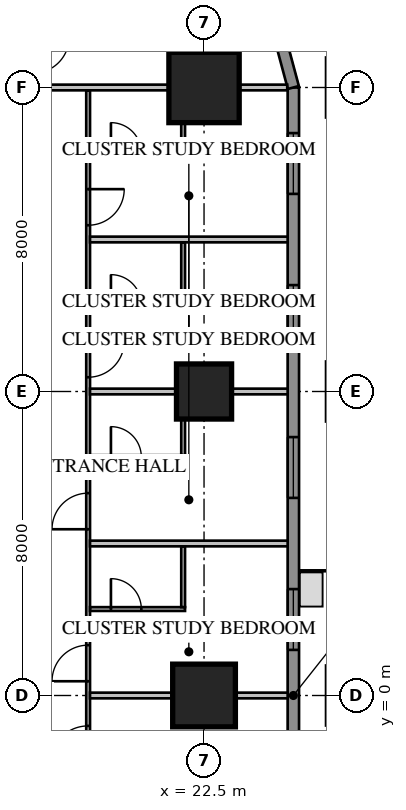
"""IFC4 building model, lengths in metres.
Left out: names, types, materials, properties, quantities, classifications, styles, units other than length and angle.
Written with IfcOpenShell. Run it as: python <this file> out.ifc"""

import sys

from ifc_helpers import new_model, si_unit, direction, frame, frame_2d, origin, origin_2d, place, context, subcontext, project, spatial, rectangle, extrude, element, fill, save


model = new_model("IFC4")
c1 = context("Model", 3, precision=1e-05, world=origin(), true_north=direction((0.0, 1.0)))
c2 = subcontext(c1, "Body", "Model", "MODEL_VIEW")
j1 = project(units=[si_unit("LENGTHUNIT", "METRE"), si_unit("PLANEANGLEUNIT", "RADIAN")], contexts=[c1])
p1 = place(None, origin())
s1 = spatial("IfcSite", under=j1, at=p1, CompositionType="ELEMENT")
p2 = place(p1, origin())
s2 = spatial("IfcBuilding", under=s1, at=p2, CompositionType="ELEMENT")
p3 = place(p2, frame((0.0, 0.0, 46.8)))
s3 = spatial("IfcBuildingStorey", under=s2, at=p3, CompositionType="ELEMENT", Elevation=46.8)
p4 = place(p3, frame((22.5, 0.0, 0.0), z_axis=(0.0, 0.0, 1.0), x_axis=(1.0, 0.0, 0.0)))
e1 = element("IfcColumn", 1, at=p4, inside=s3, PredefinedType="COLUMN", context=c2, shape_type="SweptSolid", body=[
    extrude(rectangle(XDim=1.65, YDim=1.65, at=origin_2d()), origin(), (0.0, 0.0, 1.0), 3.85),
])
p5 = place(p3, frame((22.5, 8.0, 0.0), z_axis=(0.0, 0.0, 1.0), x_axis=(1.0, 0.0, 0.0)))
e2 = element("IfcColumn", 2, at=p5, inside=s3, PredefinedType="COLUMN", context=c2, shape_type="SweptSolid", body=[
    extrude(rectangle(XDim=1.45, YDim=1.45, at=origin_2d()), origin(), (0.0, 0.0, 1.0), 3.85),
])
p6 = place(p3, frame((22.5, 16.0, 0.0), z_axis=(0.0, 0.0, 1.0), x_axis=(1.0, 0.0, 0.0)))
e3 = element("IfcColumn", 3, at=p6, inside=s3, PredefinedType="COLUMN", context=c2, shape_type="SweptSolid", body=[
    extrude(rectangle(XDim=1.85, YDim=1.85, at=origin_2d()), origin(), (0.0, 0.0, 1.0), 3.85),
])
p7 = place(p3, frame((24.85, -16.0, 0.0), z_axis=(0.0, 0.0, 1.0), x_axis=(0.0, 1.0, 0.0)))
e4 = element("IfcWall", 4, at=p7, inside=s3, PredefinedType="SOLIDWALL", context=c2, shape_type="SweptSolid", body=[
    extrude(rectangle(XDim=32.0, YDim=0.3, at=frame_2d((16.0, 0.0))), origin(), (0.0, 0.0, 1.0), 3.65),
])
p8 = place(p7, frame((1.2, 0.0, 0.75)))
e5 = element("IfcOpeningElement", 5, at=p8, cuts=e4, PredefinedType="OPENING", context=c2, shape_type="SweptSolid", body=[
    extrude(rectangle(XDim=1.6, YDim=1.8, at=frame_2d((0.8, 0.9))), frame((0.0, 0.17, 0.0), z_axis=(0.0, -1.0, 0.0), x_axis=(1.0, 0.0, 0.0)), (0.0, 0.0, 1.0), 0.34),
])
p9 = place(p7, frame((5.2, 0.0, 0.75)))
e6 = element("IfcOpeningElement", 6, at=p9, cuts=e4, PredefinedType="OPENING", context=c2, shape_type="SweptSolid", body=[
    extrude(rectangle(XDim=1.6, YDim=1.8, at=frame_2d((0.8, 0.9))), frame((0.0, 0.17, 0.0), z_axis=(0.0, -1.0, 0.0), x_axis=(1.0, 0.0, 0.0)), (0.0, 0.0, 1.0), 0.34),
])
p10 = place(p7, frame((17.2, 0.0, 0.75)))
e7 = element("IfcOpeningElement", 7, at=p10, cuts=e4, PredefinedType="OPENING", context=c2, shape_type="SweptSolid", body=[
    extrude(rectangle(XDim=1.6, YDim=1.8, at=frame_2d((0.8, 0.9))), frame((0.0, 0.17, 0.0), z_axis=(0.0, -1.0, 0.0), x_axis=(1.0, 0.0, 0.0)), (0.0, 0.0, 1.0), 0.34),
])
p11 = place(p7, frame((21.2, 0.0, 0.75)))
e8 = element("IfcOpeningElement", 8, at=p11, cuts=e4, PredefinedType="OPENING", context=c2, shape_type="SweptSolid", body=[
    extrude(rectangle(XDim=1.6, YDim=1.8, at=frame_2d((0.8, 0.9))), frame((0.0, 0.17, 0.0), z_axis=(0.0, -1.0, 0.0), x_axis=(1.0, 0.0, 0.0)), (0.0, 0.0, 1.0), 0.34),
])
p12 = place(p7, frame((25.2, 0.0, 0.75)))
e9 = element("IfcOpeningElement", 9, at=p12, cuts=e4, PredefinedType="OPENING", context=c2, shape_type="SweptSolid", body=[
    extrude(rectangle(XDim=1.6, YDim=1.8, at=frame_2d((0.8, 0.9))), frame((0.0, 0.17, 0.0), z_axis=(0.0, -1.0, 0.0), x_axis=(1.0, 0.0, 0.0)), (0.0, 0.0, 1.0), 0.34),
])
p13 = place(p7, frame((29.2, 0.0, 0.75)))
e10 = element("IfcOpeningElement", 10, at=p13, cuts=e4, PredefinedType="OPENING", context=c2, shape_type="SweptSolid", body=[
    extrude(rectangle(XDim=1.6, YDim=1.8, at=frame_2d((0.8, 0.9))), frame((0.0, 0.17, 0.0), z_axis=(0.0, -1.0, 0.0), x_axis=(1.0, 0.0, 0.0)), (0.0, 0.0, 1.0), 0.34),
])
p14 = place(p7, frame((8.8, 0.0, 0.75)))
e11 = element("IfcOpeningElement", 11, at=p14, cuts=e4, PredefinedType="OPENING", context=c2, shape_type="SweptSolid", body=[
    extrude(rectangle(XDim=2.4, YDim=1.8, at=frame_2d((1.2, 0.9))), frame((0.0, 0.17, 0.0), z_axis=(0.0, -1.0, 0.0), x_axis=(1.0, 0.0, 0.0)), (0.0, 0.0, 1.0), 0.34),
])
p15 = place(p7, frame((13.812, 0.0, 0.0)))
e12 = element("IfcOpeningElement", 12, at=p15, cuts=e4, PredefinedType="OPENING", context=c2, shape_type="SweptSolid", body=[
    extrude(rectangle(XDim=1.0, YDim=2.4, at=frame_2d((0.5, 1.2))), frame((0.0, 0.17, 0.0), z_axis=(0.0, -1.0, 0.0), x_axis=(1.0, 0.0, 0.0)), (0.0, 0.0, 1.0), 0.34),
])
p16 = place(p3, frame((24.85, 16.0, 0.0), z_axis=(0.0, 0.0, 1.0), x_axis=(-0.258839972501, 0.965920218567, 0.0)))
e13 = element("IfcWall", 13, at=p16, inside=s3, PredefinedType="SOLIDWALL", context=c2, shape_type="SweptSolid", body=[
    extrude(rectangle(XDim=4.581, YDim=0.3, at=frame_2d((2.291, 0.0))), origin(), (0.0, 0.0, 1.0), 3.65),
])
p17 = place(p3, frame((19.45, -3.925, 0.0), z_axis=(0.0, 0.0, 1.0), x_axis=(0.0, 1.0, 0.0)))
e14 = element("IfcWall", 14, at=p17, inside=s3, PredefinedType="PARTITIONING", context=c2, shape_type="SweptSolid", body=[
    extrude(rectangle(XDim=19.85, YDim=0.1, at=frame_2d((9.925, 0.0))), origin(), (0.0, 0.0, 1.0), 3.65),
])
p18 = place(p17, frame((2.125, 0.0, 0.0)))
e15 = element("IfcOpeningElement", 15, at=p18, cuts=e14, PredefinedType="OPENING", context=c2, shape_type="SweptSolid", body=[
    extrude(rectangle(XDim=1.0, YDim=2.1, at=frame_2d((0.5, 1.05))), frame((0.0, 0.07, 0.0), z_axis=(0.0, -1.0, 0.0), x_axis=(1.0, 0.0, 0.0)), (0.0, 0.0, 1.0), 0.14),
])
p19 = place(p17, frame((0.3, 0.0, 0.0)))
e16 = element("IfcOpeningElement", 16, at=p19, cuts=e14, PredefinedType="OPENING", context=c2, shape_type="SweptSolid", body=[
    extrude(rectangle(XDim=0.8, YDim=2.1, at=frame_2d((0.4, 1.05))), frame((0.0, 0.07, 0.0), z_axis=(0.0, -1.0, 0.0), x_axis=(1.0, 0.0, 0.0)), (0.0, 0.0, 1.0), 0.14),
])
p20 = place(p17, frame((4.3, 0.0, 0.0)))
e17 = element("IfcOpeningElement", 17, at=p20, cuts=e14, PredefinedType="OPENING", context=c2, shape_type="SweptSolid", body=[
    extrude(rectangle(XDim=0.95, YDim=2.1, at=frame_2d((0.475, 1.05))), frame((0.0, 0.07, 0.0), z_axis=(0.0, -1.0, 0.0), x_axis=(1.0, 0.0, 0.0)), (0.0, 0.0, 1.0), 0.14),
])
p21 = place(p17, frame((8.3, 0.0, 0.0)))
e18 = element("IfcOpeningElement", 18, at=p21, cuts=e14, PredefinedType="OPENING", context=c2, shape_type="SweptSolid", body=[
    extrude(rectangle(XDim=0.95, YDim=2.1, at=frame_2d((0.475, 1.05))), frame((0.0, 0.07, 0.0), z_axis=(0.0, -1.0, 0.0), x_axis=(1.0, 0.0, 0.0)), (0.0, 0.0, 1.0), 0.14),
])
p22 = place(p17, frame((12.3, 0.0, 0.0)))
e19 = element("IfcOpeningElement", 19, at=p22, cuts=e14, PredefinedType="OPENING", context=c2, shape_type="SweptSolid", body=[
    extrude(rectangle(XDim=0.95, YDim=2.1, at=frame_2d((0.475, 1.05))), frame((0.0, 0.07, 0.0), z_axis=(0.0, -1.0, 0.0), x_axis=(1.0, 0.0, 0.0)), (0.0, 0.0, 1.0), 0.14),
])
p23 = place(p17, frame((16.3, 0.0, 0.0)))
e20 = element("IfcOpeningElement", 20, at=p23, cuts=e14, PredefinedType="OPENING", context=c2, shape_type="SweptSolid", body=[
    extrude(rectangle(XDim=0.95, YDim=2.1, at=frame_2d((0.475, 1.05))), frame((0.0, 0.07, 0.0), z_axis=(0.0, -1.0, 0.0), x_axis=(1.0, 0.0, 0.0)), (0.0, 0.0, 1.0), 0.14),
])
p24 = place(p3, frame((19.5, 0.0, 0.0), z_axis=(0.0, 0.0, 1.0), x_axis=(1.0, 0.0, 0.0)))
e21 = element("IfcWall", 21, at=p24, inside=s3, PredefinedType="PARTITIONING", context=c2, shape_type="SweptSolid", body=[
    extrude(rectangle(XDim=5.2, YDim=0.15, at=frame_2d((2.6, 0.0))), origin(), (0.0, 0.0, 1.0), 2.957),
])
for number, where, z_axis, x_axis in (
    (22, (19.5, 4.0, 0.0), (0.0, 0.0, 1.0), (1.0, 0.0, 0.0)),
    (23, (19.5, 8.0, 0.0), (0.0, 0.0, 1.0), (1.0, 0.0, 0.0)),
    (24, (19.5, 12.0, 0.0), (0.0, 0.0, 1.0), (1.0, 0.0, 0.0)),
):
    element("IfcWall", number, at=place(p3, frame(where, z_axis=z_axis, x_axis=x_axis)), inside=s3, PredefinedType="PARTITIONING", context=c2, shape_type="SweptSolid", body=[
        extrude(rectangle(XDim=5.2, YDim=0.15, at=frame_2d((2.6, 0.0))), origin(), (0.0, 0.0, 1.0), 3.65),
    ])
p25 = place(p3, frame((18.1, 16.0, 0.0), z_axis=(0.0, 0.0, 1.0), x_axis=(1.0, 0.0, 0.0)))
e25 = element("IfcWall", 25, at=p25, inside=s3, PredefinedType="PARTITIONING", context=c2, shape_type="SweptSolid", body=[
    extrude(rectangle(XDim=6.589, YDim=0.15, at=frame_2d((3.295, 0.0))), origin(), (0.0, 0.0, 1.0), 3.65),
])
p26 = place(p3, frame((19.5, 2.275, 0.0), z_axis=(0.0, 0.0, 1.0), x_axis=(1.0, 0.0, 0.0)))
e26 = element("IfcWall", 26, at=p26, inside=s3, PredefinedType="PARTITIONING", context=c2, shape_type="SweptSolid", body=[
    extrude(rectangle(XDim=2.5, YDim=0.1, at=frame_2d((1.25, 0.0))), origin(), (0.0, 0.0, 1.0), 3.65),
])
p27 = place(p26, frame((0.55, 0.0, 0.0)))
e27 = element("IfcOpeningElement", 27, at=p27, cuts=e26, PredefinedType="OPENING", context=c2, shape_type="SweptSolid", body=[
    extrude(rectangle(XDim=0.8, YDim=2.1, at=frame_2d((0.4, 1.05))), frame((0.0, 0.07, 0.0), z_axis=(0.0, -1.0, 0.0), x_axis=(1.0, 0.0, 0.0)), (0.0, 0.0, 1.0), 0.14),
])
p28 = place(p3, frame((21.95, 2.325, 0.0), z_axis=(0.0, 0.0, 1.0), x_axis=(0.0, 1.0, 0.0)))
e28 = element("IfcWall", 28, at=p28, inside=s3, PredefinedType="PARTITIONING", context=c2, shape_type="SweptSolid", body=[
    extrude(rectangle(XDim=1.6, YDim=0.1, at=frame_2d((0.8, 0.0))), origin(), (0.0, 0.0, 1.0), 3.65),
])
p29 = place(p3, frame((19.5, 6.275, 0.0), z_axis=(0.0, 0.0, 1.0), x_axis=(1.0, 0.0, 0.0)))
e29 = element("IfcWall", 29, at=p29, inside=s3, PredefinedType="PARTITIONING", context=c2, shape_type="SweptSolid", body=[
    extrude(rectangle(XDim=2.5, YDim=0.1, at=frame_2d((1.25, 0.0))), origin(), (0.0, 0.0, 1.0), 3.65),
])
p30 = place(p29, frame((0.55, 0.0, 0.0)))
e30 = element("IfcOpeningElement", 30, at=p30, cuts=e29, PredefinedType="OPENING", context=c2, shape_type="SweptSolid", body=[
    extrude(rectangle(XDim=0.8, YDim=2.1, at=frame_2d((0.4, 1.05))), frame((0.0, 0.07, 0.0), z_axis=(0.0, -1.0, 0.0), x_axis=(1.0, 0.0, 0.0)), (0.0, 0.0, 1.0), 0.14),
])
p31 = place(p3, frame((21.95, 6.325, 0.0), z_axis=(0.0, 0.0, 1.0), x_axis=(0.0, 1.0, 0.0)))
e31 = element("IfcWall", 31, at=p31, inside=s3, PredefinedType="PARTITIONING", context=c2, shape_type="SweptSolid", body=[
    extrude(rectangle(XDim=1.6, YDim=0.1, at=frame_2d((0.8, 0.0))), origin(), (0.0, 0.0, 1.0), 3.65),
])
p32 = place(p3, frame((19.5, 10.275, 0.0), z_axis=(0.0, 0.0, 1.0), x_axis=(1.0, 0.0, 0.0)))
e32 = element("IfcWall", 32, at=p32, inside=s3, PredefinedType="PARTITIONING", context=c2, shape_type="SweptSolid", body=[
    extrude(rectangle(XDim=2.5, YDim=0.1, at=frame_2d((1.25, 0.0))), origin(), (0.0, 0.0, 1.0), 3.65),
])
p33 = place(p32, frame((0.55, 0.0, 0.0)))
e33 = element("IfcOpeningElement", 33, at=p33, cuts=e32, PredefinedType="OPENING", context=c2, shape_type="SweptSolid", body=[
    extrude(rectangle(XDim=0.8, YDim=2.1, at=frame_2d((0.4, 1.05))), frame((0.0, 0.07, 0.0), z_axis=(0.0, -1.0, 0.0), x_axis=(1.0, 0.0, 0.0)), (0.0, 0.0, 1.0), 0.14),
])
p34 = place(p3, frame((21.95, 10.325, 0.0), z_axis=(0.0, 0.0, 1.0), x_axis=(0.0, 1.0, 0.0)))
e34 = element("IfcWall", 34, at=p34, inside=s3, PredefinedType="PARTITIONING", context=c2, shape_type="SweptSolid", body=[
    extrude(rectangle(XDim=1.6, YDim=0.1, at=frame_2d((0.8, 0.0))), origin(), (0.0, 0.0, 1.0), 3.65),
])
p35 = place(p3, frame((19.5, 14.275, 0.0), z_axis=(0.0, 0.0, 1.0), x_axis=(1.0, 0.0, 0.0)))
e35 = element("IfcWall", 35, at=p35, inside=s3, PredefinedType="PARTITIONING", context=c2, shape_type="SweptSolid", body=[
    extrude(rectangle(XDim=2.5, YDim=0.1, at=frame_2d((1.25, 0.0))), origin(), (0.0, 0.0, 1.0), 3.65),
])
p36 = place(p35, frame((0.55, 0.0, 0.0)))
e36 = element("IfcOpeningElement", 36, at=p36, cuts=e35, PredefinedType="OPENING", context=c2, shape_type="SweptSolid", body=[
    extrude(rectangle(XDim=0.8, YDim=2.1, at=frame_2d((0.4, 1.05))), frame((0.0, 0.07, 0.0), z_axis=(0.0, -1.0, 0.0), x_axis=(1.0, 0.0, 0.0)), (0.0, 0.0, 1.0), 0.14),
])
p37 = place(p3, frame((21.95, 14.325, 0.0), z_axis=(0.0, 0.0, 1.0), x_axis=(0.0, 1.0, 0.0)))
e37 = element("IfcWall", 37, at=p37, inside=s3, PredefinedType="PARTITIONING", context=c2, shape_type="SweptSolid", body=[
    extrude(rectangle(XDim=1.6, YDim=0.1, at=frame_2d((0.8, 0.0))), origin(), (0.0, 0.0, 1.0), 3.65),
])
p38 = place(p10, origin())
e38 = element("IfcWindow", 38, at=p38, inside=s3, PartitioningType="SINGLE_PANEL", PredefinedType="WINDOW", context=c2, shape_type="SweptSolid", body=[
    extrude(rectangle(XDim=1.6, YDim=1.8, at=frame_2d((0.8, 0.9))), frame((0.0, 0.03, 0.0), z_axis=(0.0, -1.0, 0.0), x_axis=(1.0, 0.0, 0.0)), (0.0, 0.0, 1.0), 0.06),
])
fill(e7, e38)
p39 = place(p11, origin())
e39 = element("IfcWindow", 39, at=p39, inside=s3, PartitioningType="SINGLE_PANEL", PredefinedType="WINDOW", context=c2, shape_type="SweptSolid", body=[
    extrude(rectangle(XDim=1.6, YDim=1.8, at=frame_2d((0.8, 0.9))), frame((0.0, 0.03, 0.0), z_axis=(0.0, -1.0, 0.0), x_axis=(1.0, 0.0, 0.0)), (0.0, 0.0, 1.0), 0.06),
])
fill(e8, e39)
p40 = place(p12, origin())
e40 = element("IfcWindow", 40, at=p40, inside=s3, PartitioningType="SINGLE_PANEL", PredefinedType="WINDOW", context=c2, shape_type="SweptSolid", body=[
    extrude(rectangle(XDim=1.6, YDim=1.8, at=frame_2d((0.8, 0.9))), frame((0.0, 0.03, 0.0), z_axis=(0.0, -1.0, 0.0), x_axis=(1.0, 0.0, 0.0)), (0.0, 0.0, 1.0), 0.06),
])
fill(e9, e40)
p41 = place(p13, origin())
e41 = element("IfcWindow", 41, at=p41, inside=s3, PartitioningType="SINGLE_PANEL", PredefinedType="WINDOW", context=c2, shape_type="SweptSolid", body=[
    extrude(rectangle(XDim=1.6, YDim=1.8, at=frame_2d((0.8, 0.9))), frame((0.0, 0.03, 0.0), z_axis=(0.0, -1.0, 0.0), x_axis=(1.0, 0.0, 0.0)), (0.0, 0.0, 1.0), 0.06),
])
fill(e10, e41)
p42 = place(p18, origin())
e42 = element("IfcDoor", 42, at=p42, inside=s3, OperationType="SINGLE_SWING_LEFT", PredefinedType="DOOR", context=c2, shape_type="SweptSolid", body=[
    extrude(rectangle(XDim=1.0, YDim=2.1, at=frame_2d((0.5, 1.05))), frame((0.0, 0.025, 0.0), z_axis=(0.0, -1.0, 0.0), x_axis=(1.0, 0.0, 0.0)), (0.0, 0.0, 1.0), 0.05),
])
fill(e15, e42)
p43 = place(p20, origin())
e43 = element("IfcDoor", 43, at=p43, inside=s3, OperationType="SINGLE_SWING_LEFT", PredefinedType="DOOR", context=c2, shape_type="SweptSolid", body=[
    extrude(rectangle(XDim=0.95, YDim=2.1, at=frame_2d((0.475, 1.05))), frame((0.0, 0.025, 0.0), z_axis=(0.0, -1.0, 0.0), x_axis=(1.0, 0.0, 0.0)), (0.0, 0.0, 1.0), 0.05),
])
fill(e17, e43)
p44 = place(p27, origin())
e44 = element("IfcDoor", 44, at=p44, inside=s3, OperationType="SINGLE_SWING_LEFT", PredefinedType="DOOR", context=c2, shape_type="SweptSolid", body=[
    extrude(rectangle(XDim=0.8, YDim=2.1, at=frame_2d((0.4, 1.05))), frame((0.0, 0.025, 0.0), z_axis=(0.0, -1.0, 0.0), x_axis=(1.0, 0.0, 0.0)), (0.0, 0.0, 1.0), 0.05),
])
fill(e27, e44)
p45 = place(p21, origin())
e45 = element("IfcDoor", 45, at=p45, inside=s3, OperationType="SINGLE_SWING_LEFT", PredefinedType="DOOR", context=c2, shape_type="SweptSolid", body=[
    extrude(rectangle(XDim=0.95, YDim=2.1, at=frame_2d((0.475, 1.05))), frame((0.0, 0.025, 0.0), z_axis=(0.0, -1.0, 0.0), x_axis=(1.0, 0.0, 0.0)), (0.0, 0.0, 1.0), 0.05),
])
fill(e18, e45)
p46 = place(p30, origin())
e46 = element("IfcDoor", 46, at=p46, inside=s3, OperationType="SINGLE_SWING_LEFT", PredefinedType="DOOR", context=c2, shape_type="SweptSolid", body=[
    extrude(rectangle(XDim=0.8, YDim=2.1, at=frame_2d((0.4, 1.05))), frame((0.0, 0.025, 0.0), z_axis=(0.0, -1.0, 0.0), x_axis=(1.0, 0.0, 0.0)), (0.0, 0.0, 1.0), 0.05),
])
fill(e30, e46)
p47 = place(p22, origin())
e47 = element("IfcDoor", 47, at=p47, inside=s3, OperationType="SINGLE_SWING_RIGHT", PredefinedType="DOOR", context=c2, shape_type="SweptSolid", body=[
    extrude(rectangle(XDim=0.95, YDim=2.1, at=frame_2d((0.475, 1.05))), frame((0.0, 0.025, 0.0), z_axis=(0.0, -1.0, 0.0), x_axis=(1.0, 0.0, 0.0)), (0.0, 0.0, 1.0), 0.05),
])
fill(e19, e47)
p48 = place(p33, origin())
e48 = element("IfcDoor", 48, at=p48, inside=s3, OperationType="SINGLE_SWING_LEFT", PredefinedType="DOOR", context=c2, shape_type="SweptSolid", body=[
    extrude(rectangle(XDim=0.8, YDim=2.1, at=frame_2d((0.4, 1.05))), frame((0.0, 0.025, 0.0), z_axis=(0.0, -1.0, 0.0), x_axis=(1.0, 0.0, 0.0)), (0.0, 0.0, 1.0), 0.05),
])
fill(e33, e48)
p49 = place(p23, origin())
e49 = element("IfcDoor", 49, at=p49, inside=s3, OperationType="SINGLE_SWING_RIGHT", PredefinedType="DOOR", context=c2, shape_type="SweptSolid", body=[
    extrude(rectangle(XDim=0.95, YDim=2.1, at=frame_2d((0.475, 1.05))), frame((0.0, 0.025, 0.0), z_axis=(0.0, -1.0, 0.0), x_axis=(1.0, 0.0, 0.0)), (0.0, 0.0, 1.0), 0.05),
])
fill(e20, e49)
p50 = place(p36, origin())
e50 = element("IfcDoor", 50, at=p50, inside=s3, OperationType="SINGLE_SWING_LEFT", PredefinedType="DOOR", context=c2, shape_type="SweptSolid", body=[
    extrude(rectangle(XDim=0.8, YDim=2.1, at=frame_2d((0.4, 1.05))), frame((0.0, 0.025, 0.0), z_axis=(0.0, -1.0, 0.0), x_axis=(1.0, 0.0, 0.0)), (0.0, 0.0, 1.0), 0.05),
])
fill(e36, e50)
save(model, sys.argv[1])
